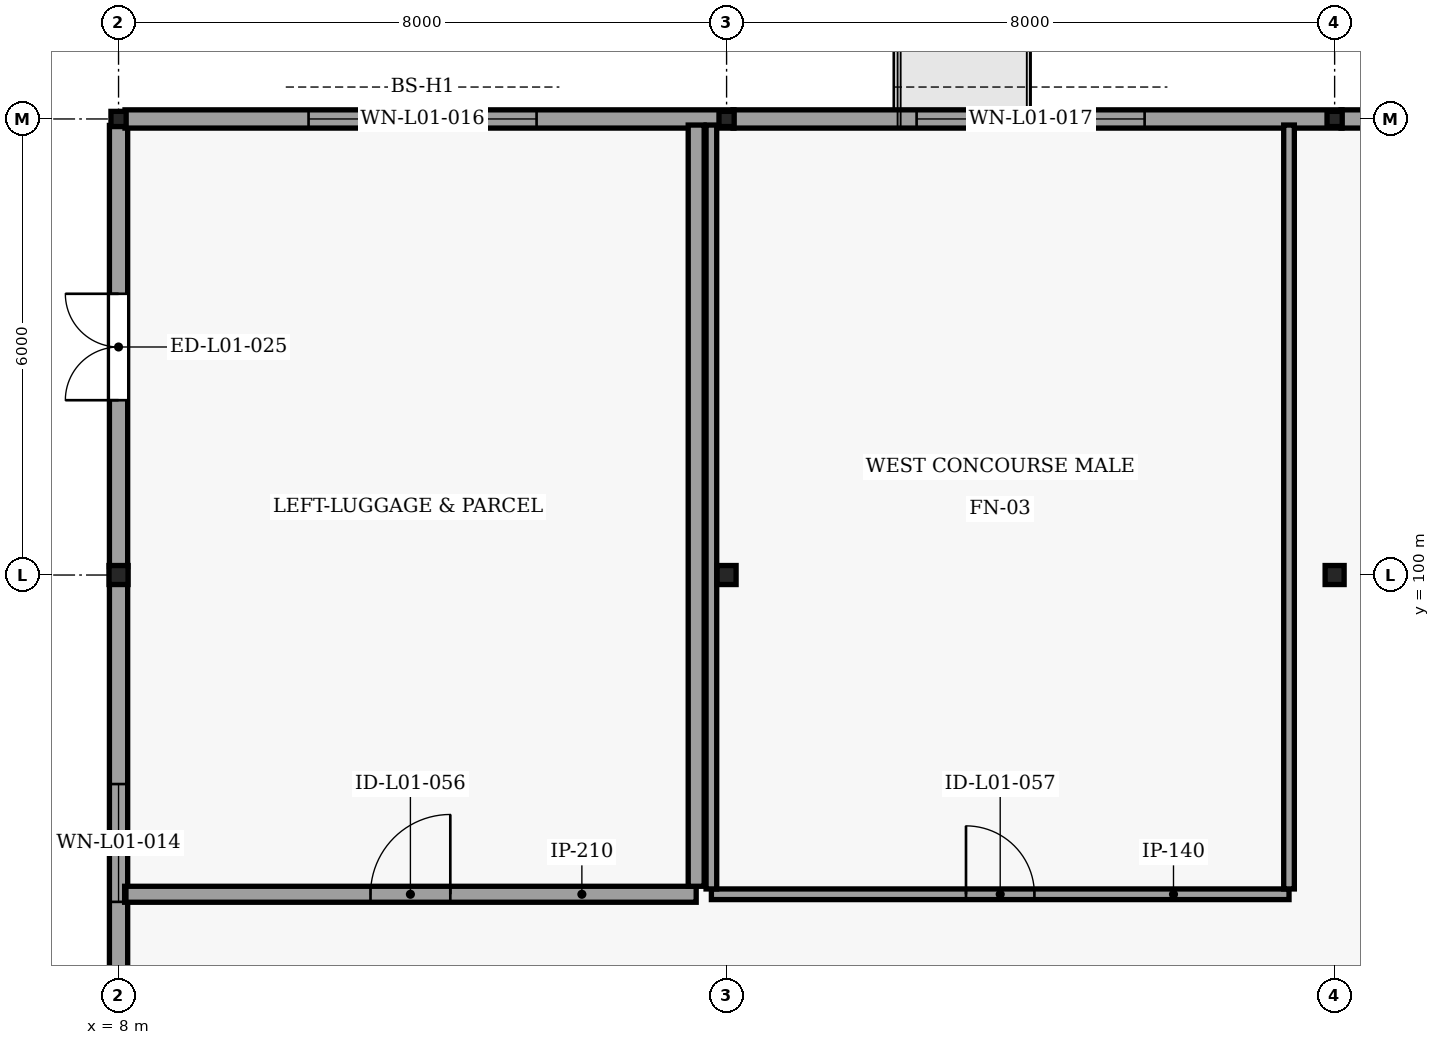
"""IFC4 building model, lengths in metres.
Left out: names, types, materials, properties, quantities, classifications, styles, units other than length and angle.
Written with IfcOpenShell. Run it as: python <this file> out.ifc"""

import sys

from ifc_helpers import new_model, si_unit, direction, frame, frame_2d, origin, origin_2d, place, context, subcontext, project, spatial, rectangle, hollow_rectangle, extrude, element, fill, save


model = new_model("IFC4")
c1 = context("Model", 3, precision=1e-05, world=origin(), true_north=direction((0.0, 1.0)))
c2 = subcontext(c1, "Body", "Model", "MODEL_VIEW")
j1 = project(units=[si_unit("LENGTHUNIT", "METRE"), si_unit("PLANEANGLEUNIT", "RADIAN")], contexts=[c1])
p1 = place(None, origin())
s1 = spatial("IfcSite", under=j1, at=p1, CompositionType="ELEMENT")
p2 = place(p1, origin())
s2 = spatial("IfcBuilding", under=s1, at=p2, CompositionType="ELEMENT")
p3 = place(p2, origin())
s3 = spatial("IfcBuildingStorey", under=s2, at=p3, CompositionType="ELEMENT", Elevation=0.0)
for number, where, z_axis, x_axis in (
    (1, (8.0, 100.0, -0.45), (0.0, 0.0, 1.0), (1.0, 0.0, 0.0)),
    (2, (16.0, 100.0, -0.45), (0.0, 0.0, 1.0), (1.0, 0.0, 0.0)),
    (3, (24.0, 100.0, -0.45), (0.0, 0.0, 1.0), (1.0, 0.0, 0.0)),
):
    element("IfcColumn", number, at=place(p3, frame(where, z_axis=z_axis, x_axis=x_axis)), inside=s3, PredefinedType="COLUMN", context=c2, shape_type="SweptSolid", body=[
        extrude(hollow_rectangle(XDim=0.25, YDim=0.25, WallThickness=0.012, InnerFilletRadius=0.012, OuterFilletRadius=0.025, at=origin_2d()), origin(), (0.0, 0.0, 1.0), 5.57),
    ])
for number, where, z_axis, x_axis in (
    (4, (8.0, 106.0, -0.45), (0.0, 0.0, 1.0), (1.0, 0.0, 0.0)),
    (5, (16.0, 106.0, -0.45), (0.0, 0.0, 1.0), (1.0, 0.0, 0.0)),
    (6, (24.0, 106.0, -0.45), (0.0, 0.0, 1.0), (1.0, 0.0, 0.0)),
):
    element("IfcColumn", number, at=place(p3, frame(where, z_axis=z_axis, x_axis=x_axis)), inside=s3, PredefinedType="COLUMN", context=c2, shape_type="SweptSolid", body=[
        extrude(hollow_rectangle(XDim=0.2, YDim=0.2, WallThickness=0.01, InnerFilletRadius=0.01, OuterFilletRadius=0.02, at=origin_2d()), origin(), (0.0, 0.0, 1.0), 5.57),
    ])
p4 = place(p3, frame((8.0, 89.11, 0.0), z_axis=(0.0, 0.0, 1.0), x_axis=(0.0, 1.0, 0.0)))
e7 = element("IfcWall", 7, at=p4, inside=s3, PredefinedType="ELEMENTEDWALL", context=c2, shape_type="SweptSolid", body=[
    extrude(rectangle(XDim=11.012, YDim=0.24, at=frame_2d((5.506, 0.0))), origin(), (0.0, 0.0, 1.0), 4.694),
])
p5 = place(p4, frame((2.19, 0.0, 1.1)))
e8 = element("IfcOpeningElement", 8, at=p5, cuts=e7, PredefinedType="OPENING", context=c2, shape_type="SweptSolid", body=[
    extrude(rectangle(XDim=1.6, YDim=1.3, at=frame_2d((0.8, 0.65))), frame((0.0, 0.13, 0.0), z_axis=(0.0, -1.0, 0.0), x_axis=(1.0, 0.0, 0.0)), (0.0, 0.0, 1.0), 0.26),
])
p6 = place(p4, frame((6.59, 0.0, 1.1)))
e9 = element("IfcOpeningElement", 9, at=p6, cuts=e7, PredefinedType="OPENING", context=c2, shape_type="SweptSolid", body=[
    extrude(rectangle(XDim=1.55, YDim=1.35, at=frame_2d((0.775, 0.675))), frame((0.0, 0.13, 0.0), z_axis=(0.0, -1.0, 0.0), x_axis=(1.0, 0.0, 0.0)), (0.0, 0.0, 1.0), 0.26),
])
p7 = place(p3, frame((8.0, 100.11, 0.0), z_axis=(0.0, 0.0, 1.0), x_axis=(0.0, 1.0, 0.0)))
e10 = element("IfcWall", 10, at=p7, inside=s3, PredefinedType="ELEMENTEDWALL", context=c2, shape_type="SweptSolid", body=[
    extrude(rectangle(XDim=5.805, YDim=0.24, at=frame_2d((2.902, 0.0))), origin(), (0.0, 0.0, 1.0), 4.694),
])
p8 = place(p7, frame((2.19, 0.0, 0.0)))
e11 = element("IfcOpeningElement", 11, at=p8, cuts=e10, PredefinedType="OPENING", context=c2, shape_type="SweptSolid", body=[
    extrude(rectangle(XDim=1.4, YDim=2.2, at=frame_2d((0.7, 1.1))), frame((0.0, 0.13, 0.0), z_axis=(0.0, -1.0, 0.0), x_axis=(1.0, 0.0, 0.0)), (0.0, 0.0, 1.0), 0.26),
])
p9 = place(p3, frame((8.085, 106.0, 0.0), z_axis=(0.0, 0.0, 1.0), x_axis=(1.0, 0.0, 0.0)))
e12 = element("IfcWall", 12, at=p9, inside=s3, PredefinedType="ELEMENTEDWALL", context=c2, shape_type="SweptSolid", body=[
    extrude(rectangle(XDim=8.012, YDim=0.24, at=frame_2d((4.006, 0.0))), origin(), (0.0, 0.0, 1.0), 4.694),
])
p10 = place(p9, frame((2.415, 0.0, 1.0)))
e13 = element("IfcOpeningElement", 13, at=p10, cuts=e12, PredefinedType="OPENING", context=c2, shape_type="SweptSolid", body=[
    extrude(rectangle(XDim=3.0, YDim=1.6, at=frame_2d((1.5, 0.8))), frame((0.0, 0.13, 0.0), z_axis=(0.0, -1.0, 0.0), x_axis=(1.0, 0.0, 0.0)), (0.0, 0.0, 1.0), 0.26),
])
p11 = place(p3, frame((16.085, 106.0, 0.0), z_axis=(0.0, 0.0, 1.0), x_axis=(1.0, 0.0, 0.0)))
e14 = element("IfcWall", 14, at=p11, inside=s3, PredefinedType="ELEMENTEDWALL", context=c2, shape_type="SweptSolid", body=[
    extrude(rectangle(XDim=8.012, YDim=0.24, at=frame_2d((4.006, 0.0))), origin(), (0.0, 0.0, 1.0), 4.658),
])
p12 = place(p11, frame((2.415, 0.0, 1.0)))
e15 = element("IfcOpeningElement", 15, at=p12, cuts=e14, PredefinedType="OPENING", context=c2, shape_type="SweptSolid", body=[
    extrude(rectangle(XDim=3.0, YDim=1.6, at=frame_2d((1.5, 0.8))), frame((0.0, 0.13, 0.0), z_axis=(0.0, -1.0, 0.0), x_axis=(1.0, 0.0, 0.0)), (0.0, 0.0, 1.0), 0.26),
])
p13 = place(p3, frame((24.085, 106.0, 0.0), z_axis=(0.0, 0.0, 1.0), x_axis=(1.0, 0.0, 0.0)))
e16 = element("IfcWall", 16, at=p13, inside=s3, PredefinedType="ELEMENTEDWALL", context=c2, shape_type="SweptSolid", body=[
    extrude(rectangle(XDim=8.012, YDim=0.24, at=frame_2d((4.006, 0.0))), origin(), (0.0, 0.0, 1.0), 4.658),
])
p14 = place(p13, frame((2.715, 0.0, 0.0)))
e17 = element("IfcOpeningElement", 17, at=p14, cuts=e16, PredefinedType="OPENING", context=c2, shape_type="SweptSolid", body=[
    extrude(rectangle(XDim=2.4, YDim=2.4, at=frame_2d((1.2, 1.2))), frame((0.0, 0.13, 0.0), z_axis=(0.0, -1.0, 0.0), x_axis=(1.0, 0.0, 0.0)), (0.0, 0.0, 1.0), 0.26),
])
p15 = place(p3, frame((8.08, 95.8, 0.0), z_axis=(0.0, 0.0, 1.0), x_axis=(1.0, 0.0, 0.0)))
e18 = element("IfcWall", 18, at=p15, inside=s3, PredefinedType="SOLIDWALL", context=c2, shape_type="SweptSolid", body=[
    extrude(rectangle(XDim=7.52, YDim=0.21, at=frame_2d((3.76, 0.0))), origin(), (0.0, 0.0, 1.0), 5.05),
])
p16 = place(p15, frame((3.235, 0.0, 0.0)))
e19 = element("IfcOpeningElement", 19, at=p16, cuts=e18, PredefinedType="OPENING", context=c2, shape_type="SweptSolid", body=[
    extrude(rectangle(XDim=1.05, YDim=2.15, at=frame_2d((0.525, 1.075))), frame((0.0, 0.115, 0.0), z_axis=(0.0, -1.0, 0.0), x_axis=(1.0, 0.0, 0.0)), (0.0, 0.0, 1.0), 0.23),
])
p17 = place(p3, frame((15.6, 95.905, 0.0), z_axis=(0.0, 0.0, 1.0), x_axis=(0.0, 1.0, 0.0)))
e20 = element("IfcWall", 20, at=p17, inside=s3, PredefinedType="SOLIDWALL", context=c2, shape_type="SweptSolid", body=[
    extrude(rectangle(XDim=10.015, YDim=0.21, at=frame_2d((5.007, 0.0))), origin(), (0.0, 0.0, 1.0), 4.696),
])
p18 = place(p3, frame((15.8, 95.8, 0.0), z_axis=(0.0, 0.0, 1.0), x_axis=(1.0, 0.0, 0.0)))
e21 = element("IfcWall", 21, at=p18, inside=s3, PredefinedType="PARTITIONING", context=c2, shape_type="SweptSolid", body=[
    extrude(rectangle(XDim=7.6, YDim=0.14, at=frame_2d((3.8, 0.0))), origin(), (0.0, 0.0, 1.0), 4.696),
])
p19 = place(p18, frame((3.35, 0.0, 0.0)))
e22 = element("IfcOpeningElement", 22, at=p19, cuts=e21, PredefinedType="OPENING", context=c2, shape_type="SweptSolid", body=[
    extrude(rectangle(XDim=0.9, YDim=2.1, at=frame_2d((0.45, 1.05))), frame((0.0, 0.08, 0.0), z_axis=(0.0, -1.0, 0.0), x_axis=(1.0, 0.0, 0.0)), (0.0, 0.0, 1.0), 0.16),
])
p20 = place(p3, frame((15.8, 95.87, 0.0), z_axis=(0.0, 0.0, 1.0), x_axis=(0.0, 1.0, 0.0)))
e23 = element("IfcWall", 23, at=p20, inside=s3, PredefinedType="PARTITIONING", context=c2, shape_type="SweptSolid", body=[
    extrude(rectangle(XDim=10.05, YDim=0.14, at=frame_2d((5.025, 0.0))), origin(), (0.0, 0.0, 1.0), 4.696),
])
p21 = place(p3, frame((23.4, 95.87, 0.0), z_axis=(0.0, 0.0, 1.0), x_axis=(0.0, 1.0, 0.0)))
e24 = element("IfcWall", 24, at=p21, inside=s3, PredefinedType="PARTITIONING", context=c2, shape_type="SweptSolid", body=[
    extrude(rectangle(XDim=10.05, YDim=0.14, at=frame_2d((5.025, 0.0))), origin(), (0.0, 0.0, 1.0), 4.66),
])
p22 = place(p6, origin())
e25 = element("IfcWindow", 25, at=p22, inside=s3, PartitioningType="SINGLE_PANEL", PredefinedType="WINDOW", context=c2, shape_type="SweptSolid", body=[
    extrude(rectangle(XDim=1.55, YDim=1.35, at=frame_2d((0.775, 0.675))), frame((0.0, 0.03, 0.0), z_axis=(0.0, -1.0, 0.0), x_axis=(1.0, 0.0, 0.0)), (0.0, 0.0, 1.0), 0.06),
])
fill(e9, e25)
p23 = place(p8, origin())
e26 = element("IfcDoor", 26, at=p23, inside=s3, OperationType="DOUBLE_DOOR_SINGLE_SWING", PredefinedType="DOOR", context=c2, shape_type="SweptSolid", body=[
    extrude(rectangle(XDim=1.4, YDim=2.2, at=frame_2d((0.7, 1.1))), frame((0.0, 0.025, 0.0), z_axis=(0.0, -1.0, 0.0), x_axis=(1.0, 0.0, 0.0)), (0.0, 0.0, 1.0), 0.05),
])
fill(e11, e26)
p24 = place(p10, origin())
e27 = element("IfcWindow", 27, at=p24, inside=s3, PartitioningType="SINGLE_PANEL", PredefinedType="WINDOW", context=c2, shape_type="SweptSolid", body=[
    extrude(rectangle(XDim=3.0, YDim=1.6, at=frame_2d((1.5, 0.8))), frame((0.0, 0.03, 0.0), z_axis=(0.0, -1.0, 0.0), x_axis=(1.0, 0.0, 0.0)), (0.0, 0.0, 1.0), 0.06),
])
fill(e13, e27)
p25 = place(p12, origin())
e28 = element("IfcWindow", 28, at=p25, inside=s3, PartitioningType="SINGLE_PANEL", PredefinedType="WINDOW", context=c2, shape_type="SweptSolid", body=[
    extrude(rectangle(XDim=3.0, YDim=1.6, at=frame_2d((1.5, 0.8))), frame((0.0, 0.03, 0.0), z_axis=(0.0, -1.0, 0.0), x_axis=(1.0, 0.0, 0.0)), (0.0, 0.0, 1.0), 0.06),
])
fill(e15, e28)
p26 = place(p16, origin())
e29 = element("IfcDoor", 29, at=p26, inside=s3, OperationType="SINGLE_SWING_RIGHT", PredefinedType="DOOR", context=c2, shape_type="SweptSolid", body=[
    extrude(rectangle(XDim=1.05, YDim=2.15, at=frame_2d((0.525, 1.075))), frame((0.0, 0.025, 0.0), z_axis=(0.0, -1.0, 0.0), x_axis=(1.0, 0.0, 0.0)), (0.0, 0.0, 1.0), 0.05),
])
fill(e19, e29)
p27 = place(p19, origin())
e30 = element("IfcDoor", 30, at=p27, inside=s3, OperationType="SINGLE_SWING_LEFT", PredefinedType="DOOR", context=c2, shape_type="SweptSolid", body=[
    extrude(rectangle(XDim=0.9, YDim=2.1, at=frame_2d((0.45, 1.05))), frame((0.0, 0.025, 0.0), z_axis=(0.0, -1.0, 0.0), x_axis=(1.0, 0.0, 0.0)), (0.0, 0.0, 1.0), 0.05),
])
fill(e22, e30)
save(model, sys.argv[1])
